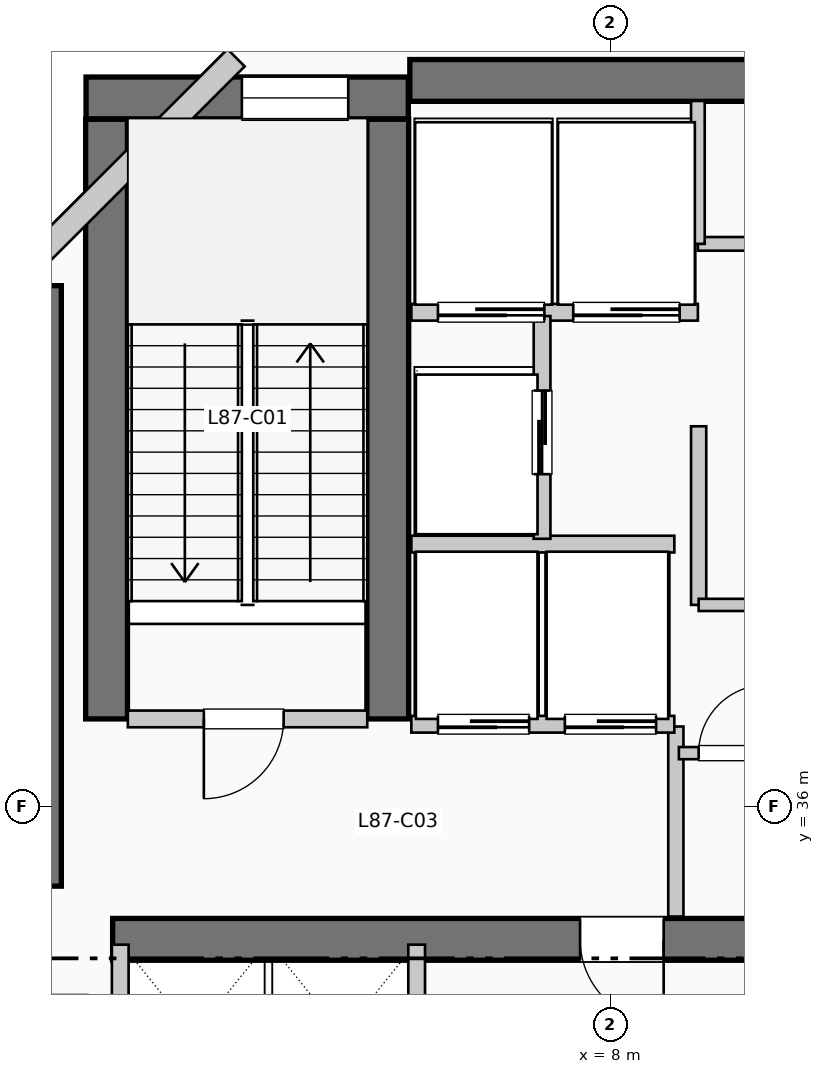
"""IFC4 building model, lengths in metres.
Left out: names, types, materials, properties, quantities, classifications, styles, units other than length and angle.
Written with IfcOpenShell. Run it as: python <this file> out.ifc"""

import sys

from ifc_helpers import new_model, si_unit, direction, frame, frame_2d, origin, place, context, subcontext, project, spatial, rectangle, extrude, element, fill, save


model = new_model("IFC4")
c1 = context("Model", 3, precision=1e-05, world=origin(), true_north=direction((0.0, 1.0)))
c2 = subcontext(c1, "Body", "Model", "MODEL_VIEW")
j1 = project(units=[si_unit("LENGTHUNIT", "METRE"), si_unit("PLANEANGLEUNIT", "RADIAN")], contexts=[c1])
p1 = place(None, origin())
s1 = spatial("IfcSite", under=j1, at=p1, CompositionType="ELEMENT")
p2 = place(p1, origin())
s2 = spatial("IfcBuilding", under=s1, at=p2, CompositionType="ELEMENT")
p3 = place(p2, frame((0.0, 0.0, 356.73)))
s3 = spatial("IfcBuildingStorey", under=s2, at=p3, CompositionType="ELEMENT", Elevation=356.73)
p4 = place(p3, frame((5.36, 45.55, 0.0), z_axis=(0.0, 0.0, 1.0), x_axis=(1.0, 0.0, 0.0)))
e1 = element("IfcWall", 1, at=p4, inside=s3, PredefinedType="SHEAR", context=c2, shape_type="SweptSolid", body=[
    extrude(rectangle(XDim=13.98, YDim=0.55, at=frame_2d((6.99, 0.0))), origin(), (0.0, 0.0, 1.0), 4.62),
])
p5 = place(p3, frame((0.5, 34.95, 0.0), z_axis=(0.0, 0.0, 1.0), x_axis=(0.0, 1.0, 0.0)))
e2 = element("IfcWall", 2, at=p5, inside=s3, PredefinedType="SHEAR", context=c2, shape_type="SweptSolid", body=[
    extrude(rectangle(XDim=7.9, YDim=0.55, at=frame_2d((3.95, 0.0))), origin(), (0.0, 0.0, 1.0), 4.62),
])
p6 = place(p3, frame((1.45, 34.25, 0.0), z_axis=(0.0, 0.0, 1.0), x_axis=(1.0, 0.0, 0.0)))
e3 = element("IfcWall", 3, at=p6, inside=s3, PredefinedType="SHEAR", context=c2, shape_type="SweptSolid", body=[
    extrude(rectangle(XDim=10.71, YDim=0.55, at=frame_2d((5.355, 0.0))), origin(), (0.0, 0.0, 1.0), 4.62),
])
p7 = place(p6, frame((7.25, 0.0, 0.0), z_axis=(0.0, 0.0, 1.0), x_axis=(-1.0, 0.0, 0.0)))
e4 = element("IfcOpeningElement", 4, at=p7, cuts=e3, PredefinedType="OPENING", context=c2, shape_type="SweptSolid", body=[
    extrude(rectangle(XDim=1.1, YDim=2.15, at=frame_2d((0.55, 1.075))), frame((0.0, 0.285, 0.0), z_axis=(0.0, -1.0, 0.0), x_axis=(1.0, 0.0, 0.0)), (0.0, 0.0, 1.0), 0.57),
])
for number, where, z_axis, x_axis in (
    (5, (1.37, 37.15, 0.0), (0.0, 0.0, 1.0), (0.0, 1.0, 0.0)),
    (6, (5.07, 37.15, 0.0), (0.0, 0.0, 1.0), (0.0, 1.0, 0.0)),
):
    element("IfcWall", number, at=place(p3, frame(where, z_axis=z_axis, x_axis=x_axis)), inside=s3, PredefinedType="SHEAR", context=c2, shape_type="SweptSolid", body=[
        extrude(rectangle(XDim=7.89, YDim=0.55, at=frame_2d((3.945, 0.0))), origin(), (0.0, 0.0, 1.0), 4.62),
    ])
p8 = place(p3, frame((1.1, 45.32, 0.0), z_axis=(0.0, 0.0, 1.0), x_axis=(1.0, 0.0, 0.0)))
e7 = element("IfcWall", 7, at=p8, inside=s3, PredefinedType="SHEAR", context=c2, shape_type="SweptSolid", body=[
    extrude(rectangle(XDim=4.24, YDim=0.55, at=frame_2d((2.12, 0.0))), origin(), (0.0, 0.0, 1.0), 4.62),
])
p9 = place(p8, frame((2.05, 0.0, 1.05)))
e8 = element("IfcOpeningElement", 8, at=p9, cuts=e7, PredefinedType="OPENING", context=c2, shape_type="SweptSolid", body=[
    extrude(rectangle(XDim=1.4, YDim=1.8, at=frame_2d((0.7, 0.9))), frame((0.0, 0.285, 0.0), z_axis=(0.0, -1.0, 0.0), x_axis=(1.0, 0.0, 0.0)), (0.0, 0.0, 1.0), 0.57),
])
p10 = place(p3, frame((3.074, 45.848, 0.0), z_axis=(0.0, 0.0, 1.0), x_axis=(-0.707106781187, -0.707106781187, 0.0)))
e9 = element("IfcWall", 9, at=p10, inside=s3, PredefinedType="SOLIDWALL", context=c2, shape_type="SweptSolid", body=[
    extrude(rectangle(XDim=4.133, YDim=0.32, at=frame_2d((2.066, 0.0))), origin(), (0.0, 0.0, 1.0), 4.37),
])
p11 = place(p3, frame((1.65, 37.15, 0.0), z_axis=(0.0, 0.0, 1.0), x_axis=(1.0, 0.0, 0.0)))
e10 = element("IfcWall", 10, at=p11, inside=s3, PredefinedType="PARTITIONING", context=c2, shape_type="SweptSolid", body=[
    extrude(rectangle(XDim=3.15, YDim=0.22, at=frame_2d((1.575, 0.0))), origin(), (0.0, 0.0, 1.0), 4.37),
])
p12 = place(p11, frame((2.05, 0.0, 0.0), z_axis=(0.0, 0.0, 1.0), x_axis=(-1.0, 0.0, 0.0)))
e11 = element("IfcOpeningElement", 11, at=p12, cuts=e10, PredefinedType="OPENING", context=c2, shape_type="SweptSolid", body=[
    extrude(rectangle(XDim=1.05, YDim=2.15, at=frame_2d((0.525, 1.075))), frame((0.0, 0.12, 0.0), z_axis=(0.0, -1.0, 0.0), x_axis=(1.0, 0.0, 0.0)), (0.0, 0.0, 1.0), 0.24),
])
p13 = place(p3, frame((8.86, 34.55, 0.0), z_axis=(0.0, 0.0, 1.0), x_axis=(0.0, 1.0, 0.0)))
e12 = element("IfcWall", 12, at=p13, inside=s3, PredefinedType="PARTITIONING", context=c2, shape_type="SweptSolid", body=[
    extrude(rectangle(XDim=2.5, YDim=0.2, at=frame_2d((1.25, 0.0))), origin(), (0.0, 0.0, 1.0), 4.37),
])
p14 = place(p3, frame((5.38, 37.08, 0.0), z_axis=(0.0, 0.0, 1.0), x_axis=(1.0, 0.0, 0.0)))
e13 = element("IfcWall", 13, at=p14, inside=s3, PredefinedType="PARTITIONING", context=c2, shape_type="SweptSolid", body=[
    extrude(rectangle(XDim=3.46, YDim=0.22, at=frame_2d((1.73, 0.0))), origin(), (0.0, 0.0, 1.0), 4.37),
])
p15 = place(p14, frame((1.55, 0.0, 0.0), z_axis=(0.0, 0.0, 1.0), x_axis=(-1.0, 0.0, 0.0)))
e14 = element("IfcOpeningElement", 14, at=p15, cuts=e13, PredefinedType="OPENING", context=c2, shape_type="SweptSolid", body=[
    extrude(rectangle(XDim=1.2, YDim=2.2, at=frame_2d((0.6, 1.1))), frame((0.0, 0.12, 0.0), z_axis=(0.0, -1.0, 0.0), x_axis=(1.0, 0.0, 0.0)), (0.0, 0.0, 1.0), 0.24),
])
p16 = place(p14, frame((3.22, 0.0, 0.0), z_axis=(0.0, 0.0, 1.0), x_axis=(-1.0, 0.0, 0.0)))
e15 = element("IfcOpeningElement", 15, at=p16, cuts=e13, PredefinedType="OPENING", context=c2, shape_type="SweptSolid", body=[
    extrude(rectangle(XDim=1.2, YDim=2.2, at=frame_2d((0.6, 1.1))), frame((0.0, 0.12, 0.0), z_axis=(0.0, -1.0, 0.0), x_axis=(1.0, 0.0, 0.0)), (0.0, 0.0, 1.0), 0.24),
])
p17 = place(p3, frame((5.38, 39.45, 0.0), z_axis=(0.0, 0.0, 1.0), x_axis=(1.0, 0.0, 0.0)))
e16 = element("IfcWall", 16, at=p17, inside=s3, PredefinedType="PARTITIONING", context=c2, shape_type="SweptSolid", body=[
    extrude(rectangle(XDim=3.46, YDim=0.22, at=frame_2d((1.73, 0.0))), origin(), (0.0, 0.0, 1.0), 4.37),
])
p18 = place(p3, frame((5.38, 42.5, 0.0), z_axis=(0.0, 0.0, 1.0), x_axis=(1.0, 0.0, 0.0)))
e17 = element("IfcWall", 17, at=p18, inside=s3, PredefinedType="PARTITIONING", context=c2, shape_type="SweptSolid", body=[
    extrude(rectangle(XDim=3.77, YDim=0.22, at=frame_2d((1.885, 0.0))), origin(), (0.0, 0.0, 1.0), 4.37),
])
p19 = place(p18, frame((1.75, 0.0, 0.0), z_axis=(0.0, 0.0, 1.0), x_axis=(-1.0, 0.0, 0.0)))
e18 = element("IfcOpeningElement", 18, at=p19, cuts=e17, PredefinedType="OPENING", context=c2, shape_type="SweptSolid", body=[
    extrude(rectangle(XDim=1.4, YDim=2.2, at=frame_2d((0.7, 1.1))), frame((0.0, 0.12, 0.0), z_axis=(0.0, -1.0, 0.0), x_axis=(1.0, 0.0, 0.0)), (0.0, 0.0, 1.0), 0.24),
])
p20 = place(p18, frame((3.53, 0.0, 0.0), z_axis=(0.0, 0.0, 1.0), x_axis=(-1.0, 0.0, 0.0)))
e19 = element("IfcOpeningElement", 19, at=p20, cuts=e17, PredefinedType="OPENING", context=c2, shape_type="SweptSolid", body=[
    extrude(rectangle(XDim=1.4, YDim=2.2, at=frame_2d((0.7, 1.1))), frame((0.0, 0.12, 0.0), z_axis=(0.0, -1.0, 0.0), x_axis=(1.0, 0.0, 0.0)), (0.0, 0.0, 1.0), 0.24),
])
p21 = place(p3, frame((7.1, 39.52, 0.0), z_axis=(0.0, 0.0, 1.0), x_axis=(0.0, 1.0, 0.0)))
e20 = element("IfcWall", 20, at=p21, inside=s3, PredefinedType="PARTITIONING", context=c2, shape_type="SweptSolid", body=[
    extrude(rectangle(XDim=2.93, YDim=0.22, at=frame_2d((1.465, 0.0))), origin(), (0.0, 0.0, 1.0), 4.37),
])
p22 = place(p21, frame((0.85, 0.0, 0.0)))
e21 = element("IfcOpeningElement", 21, at=p22, cuts=e20, PredefinedType="OPENING", context=c2, shape_type="SweptSolid", body=[
    extrude(rectangle(XDim=1.1, YDim=2.2, at=frame_2d((0.55, 1.1))), frame((0.0, 0.12, 0.0), z_axis=(0.0, -1.0, 0.0), x_axis=(1.0, 0.0, 0.0)), (0.0, 0.0, 1.0), 0.24),
])
for number, where, z_axis, x_axis in (
    (22, (1.55, 31.8, 0.0), (0.0, 0.0, 1.0), (0.0, 1.0, 0.0)),
    (23, (5.45, 31.8, 0.0), (0.0, 0.0, 1.0), (0.0, 1.0, 0.0)),
):
    element("IfcWall", number, at=place(p3, frame(where, z_axis=z_axis, x_axis=x_axis)), inside=s3, PredefinedType="PARTITIONING", context=c2, shape_type="SweptSolid", body=[
        extrude(rectangle(XDim=2.38, YDim=0.22, at=frame_2d((1.19, 0.0))), origin(), (0.0, 0.0, 1.0), 4.37),
    ])
p23 = place(p3, frame((9.16, 38.65, 0.0), z_axis=(0.0, 0.0, 1.0), x_axis=(0.0, 1.0, 0.0)))
e24 = element("IfcWall", 24, at=p23, inside=s3, PredefinedType="PARTITIONING", context=c2, shape_type="SweptSolid", body=[
    extrude(rectangle(XDim=2.35, YDim=0.2, at=frame_2d((1.175, 0.0))), origin(), (0.0, 0.0, 1.0), 4.37),
])
p24 = place(p3, frame((8.9, 36.7, 0.0), z_axis=(0.0, 0.0, 1.0), x_axis=(1.0, 0.0, 0.0)))
e25 = element("IfcWall", 25, at=p24, inside=s3, PredefinedType="PARTITIONING", context=c2, shape_type="SweptSolid", body=[
    extrude(rectangle(XDim=3.25, YDim=0.16, at=frame_2d((1.625, 0.0))), origin(), (0.0, 0.0, 1.0), 4.37),
])
p25 = place(p24, frame((0.26, 0.0, 0.0)))
e26 = element("IfcOpeningElement", 26, at=p25, cuts=e25, PredefinedType="OPENING", context=c2, shape_type="SweptSolid", body=[
    extrude(rectangle(XDim=0.9, YDim=2.15, at=frame_2d((0.45, 1.075))), frame((0.0, 0.09, 0.0), z_axis=(0.0, -1.0, 0.0), x_axis=(1.0, 0.0, 0.0)), (0.0, 0.0, 1.0), 0.18),
])
p26 = place(p24, frame((1.68, 0.0, 0.0)))
e27 = element("IfcOpeningElement", 27, at=p26, cuts=e25, PredefinedType="OPENING", context=c2, shape_type="SweptSolid", body=[
    extrude(rectangle(XDim=0.9, YDim=2.15, at=frame_2d((0.45, 1.075))), frame((0.0, 0.09, 0.0), z_axis=(0.0, -1.0, 0.0), x_axis=(1.0, 0.0, 0.0)), (0.0, 0.0, 1.0), 0.18),
])
p27 = place(p3, frame((9.16, 38.65, 0.0), z_axis=(0.0, 0.0, 1.0), x_axis=(1.0, 0.0, 0.0)))
e28 = element("IfcWall", 28, at=p27, inside=s3, PredefinedType="PARTITIONING", context=c2, shape_type="SweptSolid", body=[
    extrude(rectangle(XDim=3.42, YDim=0.16, at=frame_2d((1.71, 0.0))), origin(), (0.0, 0.0, 1.0), 4.37),
])
p28 = place(p27, frame((2.15, 0.0, 0.0), z_axis=(0.0, 0.0, 1.0), x_axis=(-1.0, 0.0, 0.0)))
e29 = element("IfcOpeningElement", 29, at=p28, cuts=e28, PredefinedType="OPENING", context=c2, shape_type="SweptSolid", body=[
    extrude(rectangle(XDim=0.95, YDim=2.15, at=frame_2d((0.475, 1.075))), frame((0.0, 0.09, 0.0), z_axis=(0.0, -1.0, 0.0), x_axis=(1.0, 0.0, 0.0)), (0.0, 0.0, 1.0), 0.18),
])
p29 = place(p3, frame((9.15, 43.4, 0.0), z_axis=(0.0, 0.0, 1.0), x_axis=(1.0, 0.0, 0.0)))
e30 = element("IfcWall", 30, at=p29, inside=s3, PredefinedType="PLUMBINGWALL", context=c2, shape_type="SweptSolid", body=[
    extrude(rectangle(XDim=9.33, YDim=0.18, at=frame_2d((4.665, 0.0))), origin(), (0.0, 0.0, 1.0), 4.37),
])
p30 = place(p29, frame((1.88, 0.0, 0.0)))
e31 = element("IfcOpeningElement", 31, at=p30, cuts=e30, PredefinedType="OPENING", context=c2, shape_type="SweptSolid", body=[
    extrude(rectangle(XDim=0.92, YDim=2.1, at=frame_2d((0.46, 1.05))), frame((0.0, 0.1, 0.0), z_axis=(0.0, -1.0, 0.0), x_axis=(1.0, 0.0, 0.0)), (0.0, 0.0, 1.0), 0.2),
])
p31 = place(p29, frame((6.515, 0.0, 0.0)))
e32 = element("IfcOpeningElement", 32, at=p31, cuts=e30, PredefinedType="OPENING", context=c2, shape_type="SweptSolid", body=[
    extrude(rectangle(XDim=0.92, YDim=2.1, at=frame_2d((0.46, 1.05))), frame((0.0, 0.1, 0.0), z_axis=(0.0, -1.0, 0.0), x_axis=(1.0, 0.0, 0.0)), (0.0, 0.0, 1.0), 0.2),
])
p32 = place(p3, frame((9.15, 43.4, 0.0), z_axis=(0.0, 0.0, 1.0), x_axis=(0.0, 1.0, 0.0)))
e33 = element("IfcWall", 33, at=p32, inside=s3, PredefinedType="PLUMBINGWALL", context=c2, shape_type="SweptSolid", body=[
    extrude(rectangle(XDim=1.88, YDim=0.18, at=frame_2d((0.94, 0.0))), origin(), (0.0, 0.0, 1.0), 4.37),
])
p33 = place(p9, origin())
e34 = element("IfcWindow", 34, at=p33, inside=s3, PartitioningType="SINGLE_PANEL", PredefinedType="WINDOW", context=c2, shape_type="SweptSolid", body=[
    extrude(rectangle(XDim=1.4, YDim=1.8, at=frame_2d((0.7, 0.9))), frame((0.0, 0.03, 0.0), z_axis=(0.0, -1.0, 0.0), x_axis=(1.0, 0.0, 0.0)), (0.0, 0.0, 1.0), 0.06),
])
fill(e8, e34)
p34 = place(p12, origin())
e35 = element("IfcDoor", 35, at=p34, inside=s3, OperationType="SINGLE_SWING_LEFT", PredefinedType="DOOR", context=c2, shape_type="SweptSolid", body=[
    extrude(rectangle(XDim=1.05, YDim=2.15, at=frame_2d((0.525, 1.075))), frame((0.0, 0.025, 0.0), z_axis=(0.0, -1.0, 0.0), x_axis=(1.0, 0.0, 0.0)), (0.0, 0.0, 1.0), 0.05),
])
fill(e11, e35)
p35 = place(p7, origin())
e36 = element("IfcDoor", 36, at=p35, inside=s3, OperationType="SINGLE_SWING_RIGHT", PredefinedType="DOOR", context=c2, shape_type="SweptSolid", body=[
    extrude(rectangle(XDim=1.1, YDim=2.15, at=frame_2d((0.55, 1.075))), frame((0.0, 0.025, 0.0), z_axis=(0.0, -1.0, 0.0), x_axis=(1.0, 0.0, 0.0)), (0.0, 0.0, 1.0), 0.05),
])
fill(e4, e36)
p36 = place(p15, origin())
e37 = element("IfcDoor", 37, at=p36, inside=s3, OperationType="SLIDING_TO_RIGHT", PredefinedType="DOOR", context=c2, shape_type="SweptSolid", body=[
    extrude(rectangle(XDim=1.2, YDim=2.2, at=frame_2d((0.6, 1.1))), frame((0.0, 0.025, 0.0), z_axis=(0.0, -1.0, 0.0), x_axis=(1.0, 0.0, 0.0)), (0.0, 0.0, 1.0), 0.05),
])
fill(e14, e37)
p37 = place(p16, origin())
e38 = element("IfcDoor", 38, at=p37, inside=s3, OperationType="SLIDING_TO_RIGHT", PredefinedType="DOOR", context=c2, shape_type="SweptSolid", body=[
    extrude(rectangle(XDim=1.2, YDim=2.2, at=frame_2d((0.6, 1.1))), frame((0.0, 0.025, 0.0), z_axis=(0.0, -1.0, 0.0), x_axis=(1.0, 0.0, 0.0)), (0.0, 0.0, 1.0), 0.05),
])
fill(e15, e38)
p38 = place(p19, origin())
e39 = element("IfcDoor", 39, at=p38, inside=s3, OperationType="SLIDING_TO_LEFT", PredefinedType="DOOR", context=c2, shape_type="SweptSolid", body=[
    extrude(rectangle(XDim=1.4, YDim=2.2, at=frame_2d((0.7, 1.1))), frame((0.0, 0.025, 0.0), z_axis=(0.0, -1.0, 0.0), x_axis=(1.0, 0.0, 0.0)), (0.0, 0.0, 1.0), 0.05),
])
fill(e18, e39)
p39 = place(p20, origin())
e40 = element("IfcDoor", 40, at=p39, inside=s3, OperationType="SLIDING_TO_LEFT", PredefinedType="DOOR", context=c2, shape_type="SweptSolid", body=[
    extrude(rectangle(XDim=1.4, YDim=2.2, at=frame_2d((0.7, 1.1))), frame((0.0, 0.025, 0.0), z_axis=(0.0, -1.0, 0.0), x_axis=(1.0, 0.0, 0.0)), (0.0, 0.0, 1.0), 0.05),
])
fill(e19, e40)
p40 = place(p22, origin())
e41 = element("IfcDoor", 41, at=p40, inside=s3, OperationType="SLIDING_TO_LEFT", PredefinedType="DOOR", context=c2, shape_type="SweptSolid", body=[
    extrude(rectangle(XDim=1.1, YDim=2.2, at=frame_2d((0.55, 1.1))), frame((0.0, 0.025, 0.0), z_axis=(0.0, -1.0, 0.0), x_axis=(1.0, 0.0, 0.0)), (0.0, 0.0, 1.0), 0.05),
])
fill(e21, e41)
p41 = place(p25, origin())
e42 = element("IfcDoor", 42, at=p41, inside=s3, OperationType="SINGLE_SWING_RIGHT", PredefinedType="DOOR", context=c2, shape_type="SweptSolid", body=[
    extrude(rectangle(XDim=0.9, YDim=2.15, at=frame_2d((0.45, 1.075))), frame((0.0, 0.025, 0.0), z_axis=(0.0, -1.0, 0.0), x_axis=(1.0, 0.0, 0.0)), (0.0, 0.0, 1.0), 0.05),
])
fill(e26, e42)
save(model, sys.argv[1])
